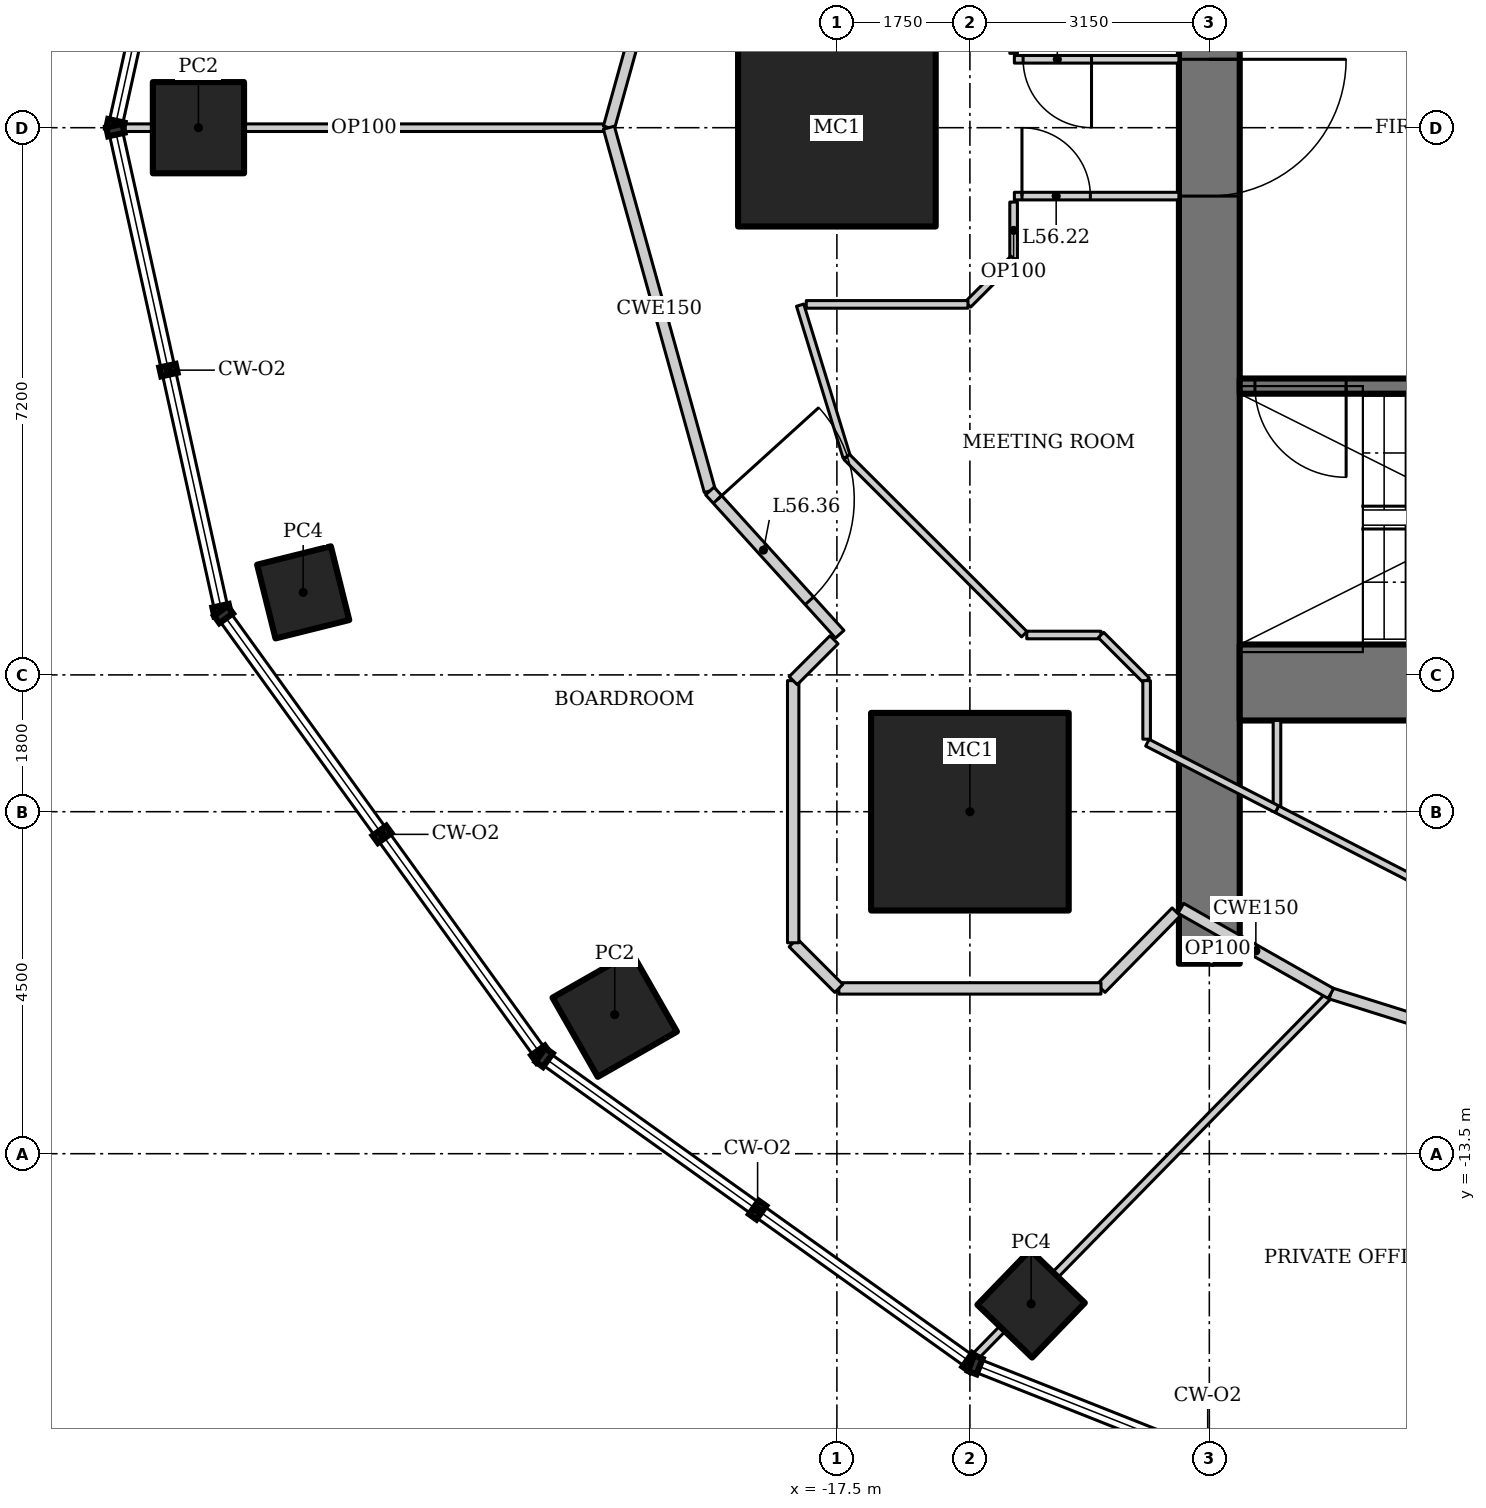
"""IFC4 building model, lengths in metres.
Left out: names, types, materials, properties, quantities, classifications, styles, units other than length and angle.
Written with IfcOpenShell. Run it as: python <this file> out.ifc"""

import sys

from ifc_helpers import new_model, si_unit, direction, frame, frame_2d, origin, origin_2d, place, context, subcontext, project, spatial, rectangle, hollow_rectangle, extrude, element, fill, save


model = new_model("IFC4")
c1 = context("Model", 3, precision=1e-05, world=origin(), true_north=direction((0.0, 1.0)))
c2 = subcontext(c1, "Body", "Model", "MODEL_VIEW")
j1 = project(units=[si_unit("LENGTHUNIT", "METRE"), si_unit("PLANEANGLEUNIT", "RADIAN")], contexts=[c1])
p1 = place(None, origin())
s1 = spatial("IfcSite", under=j1, at=p1, CompositionType="ELEMENT")
p2 = place(p1, origin())
s2 = spatial("IfcBuilding", under=s1, at=p2, CompositionType="ELEMENT")
p3 = place(p2, frame((0.0, 0.0, 241.0)))
s3 = spatial("IfcBuildingStorey", under=s2, at=p3, CompositionType="ELEMENT", Elevation=241.0)
for number, where, z_axis, x_axis in (
    (1, (-17.5, 0.0, 0.0), (0.0, 0.0, 1.0), (1.0, 0.0, 0.0)),
    (2, (-15.75, -9.0, 0.0), (0.0, 0.0, 1.0), (1.0, 0.0, 0.0)),
):
    element("IfcColumn", number, at=place(p3, frame(where, z_axis=z_axis, x_axis=x_axis)), inside=s3, PredefinedType="COLUMN", context=c2, shape_type="SweptSolid", body=[
        extrude(hollow_rectangle(XDim=2.6, YDim=2.6, WallThickness=0.13, at=origin_2d()), origin(), (0.0, 0.0, 1.0), 4.2),
    ])
p4 = place(p3, frame((-25.9, 0.0, 0.0), z_axis=(0.0, 0.0, 1.0), x_axis=(1.0, 0.0, 0.0)))
e3 = element("IfcColumn", 3, at=p4, inside=s3, PredefinedType="COLUMN", context=c2, shape_type="SweptSolid", body=[
    extrude(hollow_rectangle(XDim=1.2, YDim=1.2, WallThickness=0.1, at=origin_2d()), origin(), (0.0, 0.0, 1.0), 4.2),
])
p5 = place(p3, frame((-24.522, -6.114, 0.0), z_axis=(0.0, 0.0, 1.0), x_axis=(0.970295726276, 0.2419218956, 0.0)))
e4 = element("IfcColumn", 4, at=p5, inside=s3, PredefinedType="COLUMN", context=c2, shape_type="SweptSolid", body=[
    extrude(hollow_rectangle(XDim=1.0, YDim=1.0, WallThickness=0.08, at=origin_2d()), origin(), (0.0, 0.0, 1.0), 4.2),
])
p6 = place(p3, frame((-20.423, -11.67, 0.0), z_axis=(0.0, 0.0, 1.0), x_axis=(0.86824298017, 0.496139221777, 0.0)))
e5 = element("IfcColumn", 5, at=p6, inside=s3, PredefinedType="COLUMN", context=c2, shape_type="SweptSolid", body=[
    extrude(hollow_rectangle(XDim=1.2, YDim=1.2, WallThickness=0.1, at=origin_2d()), origin(), (0.0, 0.0, 1.0), 4.2),
])
p7 = place(p3, frame((-14.944, -15.475, 0.0), z_axis=(0.0, 0.0, 1.0), x_axis=(0.694658370459, 0.719339800339, 0.0)))
e6 = element("IfcColumn", 6, at=p7, inside=s3, PredefinedType="COLUMN", context=c2, shape_type="SweptSolid", body=[
    extrude(hollow_rectangle(XDim=1.0, YDim=1.0, WallThickness=0.08, at=origin_2d()), origin(), (0.0, 0.0, 1.0), 4.2),
])
p8 = place(p3, frame((-12.6, 11.0, 0.0), z_axis=(0.0, 0.0, 1.0), x_axis=(0.0, -1.0, 0.0)))
e7 = element("IfcWall", 7, at=p8, inside=s3, PredefinedType="SHEAR", context=c2, shape_type="SweptSolid", body=[
    extrude(rectangle(XDim=22.0, YDim=0.8, at=frame_2d((11.0, 0.0))), origin(), (0.0, 0.0, 1.0), 4.2),
])
p9 = place(p8, frame((10.1, 0.0, 0.0)))
e8 = element("IfcOpeningElement", 8, at=p9, cuts=e7, PredefinedType="OPENING", context=c2, shape_type="SweptSolid", body=[
    extrude(rectangle(XDim=1.8, YDim=2.1, at=frame_2d((0.9, 1.05))), frame((0.0, 0.41, 0.0), z_axis=(0.0, -1.0, 0.0), x_axis=(1.0, 0.0, 0.0)), (0.0, 0.0, 1.0), 0.82),
])
p10 = place(p3, frame((-12.2, -7.3, 0.0), z_axis=(0.0, 0.0, 1.0), x_axis=(1.0, 0.0, 0.0)))
e9 = element("IfcWall", 9, at=p10, inside=s3, PredefinedType="SHEAR", context=c2, shape_type="SweptSolid", body=[
    extrude(rectangle(XDim=24.4, YDim=1.0, at=frame_2d((12.2, 0.0))), origin(), (0.0, 0.0, 1.0), 4.2),
])
p11 = place(p3, frame((-5.6, -3.4, 0.0), z_axis=(0.0, 0.0, 1.0), x_axis=(-1.0, 0.0, 0.0)))
e10 = element("IfcWall", 10, at=p11, inside=s3, PredefinedType="SHEAR", context=c2, shape_type="SweptSolid", body=[
    extrude(rectangle(XDim=6.6, YDim=0.2, at=frame_2d((3.3, 0.0))), origin(), (0.0, 0.0, 1.0), 4.2),
])
p12 = place(p11, frame((5.2, 0.0, 0.0)))
e11 = element("IfcOpeningElement", 11, at=p12, cuts=e10, PredefinedType="OPENING", context=c2, shape_type="SweptSolid", body=[
    extrude(rectangle(XDim=1.2, YDim=2.1, at=frame_2d((0.6, 1.05))), frame((0.0, 0.11, 0.0), z_axis=(0.0, -1.0, 0.0), x_axis=(1.0, 0.0, 0.0)), (0.0, 0.0, 1.0), 0.22),
])
p13 = place(p3, frame((-26.944, 0.0, 0.0), z_axis=(0.0, 0.0, 1.0), x_axis=(1.0, 0.0, 0.0)))
e12 = element("IfcWall", 12, at=p13, inside=s3, PredefinedType="PARTITIONING", context=c2, shape_type="SweptSolid", body=[
    extrude(rectangle(XDim=6.444, YDim=0.1, at=frame_2d((3.222, 0.0))), origin(), (0.0, 0.0, 1.0), 3.349),
])
p14 = place(p3, frame((-15.709, -16.199, 0.0), z_axis=(0.0, 0.0, 1.0), x_axis=(0.699758297028, 0.71437967898, 0.0)))
e13 = element("IfcWall", 13, at=p14, inside=s3, PredefinedType="PARTITIONING", context=c2, shape_type="SweptSolid", body=[
    extrude(rectangle(XDim=6.729, YDim=0.1, at=frame_2d((3.365, 0.0))), origin(), (0.0, 0.0, 1.0), 3.41),
])
for number, where, z_axis, x_axis in (
    (14, (-19.172, 4.78, 0.0), (0.0, 0.0, 1.0), (-0.268, -0.964, 0.0)),
    (15, (-20.5, 0.0, 0.0), (0.0, 0.0, 1.0), (0.268, -0.964, 0.0)),
):
    element("IfcWall", number, at=place(p3, frame(where, z_axis=z_axis, x_axis=x_axis)), inside=s3, PredefinedType="PARTITIONING", context=c2, shape_type="SweptSolid", body=[
        extrude(rectangle(XDim=4.961, YDim=0.15, at=frame_2d((2.48, 0.0))), origin(), (0.0, 0.0, 1.0), 4.05),
    ])
p15 = place(p3, frame((-11.001, -11.392, 0.0), z_axis=(0.0, 0.0, 1.0), x_axis=(0.954031103669, -0.299707612903, 0.0)))
e16 = element("IfcWall", 16, at=p15, inside=s3, PredefinedType="PARTITIONING", context=c2, shape_type="SweptSolid", body=[
    extrude(rectangle(XDim=4.695, YDim=0.15, at=frame_2d((2.348, 0.0))), origin(), (0.0, 0.0, 1.0), 4.05),
])
p16 = place(p15, frame((2.0, 0.0, 0.0)))
e17 = element("IfcOpeningElement", 17, at=p16, cuts=e16, PredefinedType="OPENING", context=c2, shape_type="SweptSolid", body=[
    extrude(rectangle(XDim=0.9, YDim=2.1, at=frame_2d((0.45, 1.05))), frame((0.0, 0.085, 0.0), z_axis=(0.0, -1.0, 0.0), x_axis=(1.0, 0.0, 0.0)), (0.0, 0.0, 1.0), 0.17),
])
p17 = place(p3, frame((-11.71, -7.8, 0.0), z_axis=(0.0, 0.0, 1.0), x_axis=(0.0, -1.0, 0.0)))
e18 = element("IfcWall", 18, at=p17, inside=s3, PredefinedType="PARTITIONING", context=c2, shape_type="SweptSolid", body=[
    extrude(rectangle(XDim=1.167, YDim=0.1, at=frame_2d((0.583, 0.0))), origin(), (0.0, 0.0, 1.0), 4.05),
])
p18 = place(p3, frame((-9.67, -10.014, 0.0), z_axis=(0.0, 0.0, 1.0), x_axis=(-0.889605609385, 0.456729525814, 0.0)))
e19 = element("IfcWall", 19, at=p18, inside=s3, PredefinedType="PARTITIONING", context=c2, shape_type="SweptSolid", body=[
    extrude(rectangle(XDim=2.293, YDim=0.1, at=frame_2d((1.146, 0.0))), origin(), (0.0, 0.0, 1.0), 4.05),
])
p19 = place(p3, frame((-12.6, -11.0, 0.0), z_axis=(0.0, 0.0, 1.0), x_axis=(0.493794495037, 0.869578631678, 0.0)))
e20 = element("IfcWall", 20, at=p19, inside=s3, PredefinedType="PARTITIONING", context=c2, shape_type="SweptSolid", body=[
    extrude(rectangle(XDim=0.449, YDim=0.1, at=frame_2d((0.225, 0.0))), origin(), (0.0, 0.0, 1.0), 4.05),
])
p20 = place(p3, frame((-17.372, -4.331, 0.0), z_axis=(0.0, 0.0, 1.0), x_axis=(-0.293231279211, 0.956041535129, 0.0)))
e21 = element("IfcWall", 21, at=p20, inside=s3, PredefinedType="PARTITIONING", context=c2, shape_type="SweptSolid", body=[
    extrude(rectangle(XDim=2.088, YDim=0.1, at=frame_2d((1.044, 0.0))), origin(), (0.0, 0.0, 1.0), 4.05),
])
p21 = place(p3, frame((-15.165, -0.9, 0.0), z_axis=(0.0, 0.0, 1.0), x_axis=(1.0, 0.0, 0.0)))
e22 = element("IfcWall", 22, at=p21, inside=s3, PredefinedType="PARTITIONING", context=c2, shape_type="SweptSolid", body=[
    extrude(rectangle(XDim=2.165, YDim=0.1, at=frame_2d((1.083, 0.0))), origin(), (0.0, 0.0, 1.0), 4.05),
])
p22 = place(p21, frame((0.1, 0.0, 0.0)))
e23 = element("IfcOpeningElement", 23, at=p22, cuts=e22, PredefinedType="OPENING", context=c2, shape_type="SweptSolid", body=[
    extrude(rectangle(XDim=0.9, YDim=2.1, at=frame_2d((0.45, 1.05))), frame((0.0, 0.06, 0.0), z_axis=(0.0, -1.0, 0.0), x_axis=(1.0, 0.0, 0.0)), (0.0, 0.0, 1.0), 0.12),
])
p23 = place(p3, frame((-13.0, 0.9, 0.0), z_axis=(0.0, 0.0, 1.0), x_axis=(-1.0, 0.0, 0.0)))
e24 = element("IfcWall", 24, at=p23, inside=s3, PredefinedType="PARTITIONING", context=c2, shape_type="SweptSolid", body=[
    extrude(rectangle(XDim=2.165, YDim=0.1, at=frame_2d((1.083, 0.0))), origin(), (0.0, 0.0, 1.0), 4.05),
])
p24 = place(p23, frame((1.15, 0.0, 0.0)))
e25 = element("IfcOpeningElement", 25, at=p24, cuts=e24, PredefinedType="OPENING", context=c2, shape_type="SweptSolid", body=[
    extrude(rectangle(XDim=0.9, YDim=2.1, at=frame_2d((0.45, 1.05))), frame((0.0, 0.06, 0.0), z_axis=(0.0, -1.0, 0.0), x_axis=(1.0, 0.0, 0.0)), (0.0, 0.0, 1.0), 0.12),
])
p25 = place(p3, frame((-15.175, -0.978, 0.0), z_axis=(0.0, 0.0, 1.0), x_axis=(0.0, -1.0, 0.0)))
e26 = element("IfcWall", 26, at=p25, inside=s3, PredefinedType="PARTITIONING", context=c2, shape_type="SweptSolid", body=[
    extrude(rectangle(XDim=0.746, YDim=0.1, at=frame_2d((0.373, 0.0))), origin(), (0.0, 0.0, 1.0), 4.05),
])
p26 = place(p3, frame((-15.175, -1.725, 0.0), z_axis=(0.0, 0.0, 1.0), x_axis=(-0.707106781187, -0.707106781187, 0.0)))
e27 = element("IfcWall", 27, at=p26, inside=s3, PredefinedType="PARTITIONING", context=c2, shape_type="SweptSolid", body=[
    extrude(rectangle(XDim=0.849, YDim=0.1, at=frame_2d((0.425, 0.0))), origin(), (0.0, 0.0, 1.0), 4.05),
])
p27 = place(p3, frame((-15.775, -2.325, 0.0), z_axis=(0.0, 0.0, 1.0), x_axis=(-1.0, 0.0, 0.0)))
e28 = element("IfcWall", 28, at=p27, inside=s3, PredefinedType="PARTITIONING", context=c2, shape_type="SweptSolid", body=[
    extrude(rectangle(XDim=2.128, YDim=0.1, at=frame_2d((1.064, 0.0))), origin(), (0.0, 0.0, 1.0), 4.05),
])
p28 = place(p3, frame((-15.175, 1.725, 0.0), z_axis=(0.0, 0.0, 1.0), x_axis=(0.0, -1.0, 0.0)))
e29 = element("IfcWall", 29, at=p28, inside=s3, PredefinedType="PARTITIONING", context=c2, shape_type="SweptSolid", body=[
    extrude(rectangle(XDim=0.746, YDim=0.1, at=frame_2d((0.373, 0.0))), origin(), (0.0, 0.0, 1.0), 4.05),
])
p29 = place(p3, frame((-19.172, -4.78, 0.0), z_axis=(0.0, 0.0, 1.0), x_axis=(0.671721890643, -0.74080341632, 0.0)))
e30 = element("IfcWall", 30, at=p29, inside=s3, PredefinedType="PARTITIONING", context=c2, shape_type="SweptSolid", body=[
    extrude(rectangle(XDim=2.544, YDim=0.15, at=frame_2d((1.272, 0.0))), origin(), (0.0, 0.0, 1.0), 4.05),
])
p30 = place(p29, frame((0.15, 0.0, 0.0)))
e31 = element("IfcOpeningElement", 31, at=p30, cuts=e30, PredefinedType="OPENING", context=c2, shape_type="SweptSolid", body=[
    extrude(rectangle(XDim=1.8, YDim=2.1, at=frame_2d((0.9, 1.05))), frame((0.0, 0.085, 0.0), z_axis=(0.0, -1.0, 0.0), x_axis=(1.0, 0.0, 0.0)), (0.0, 0.0, 1.0), 0.17),
])
p31 = place(p3, frame((-12.975, -10.271, 0.0), z_axis=(0.0, 0.0, 1.0), x_axis=(0.869722107117, -0.493541747366, 0.0)))
e32 = element("IfcWall", 32, at=p31, inside=s3, PredefinedType="PARTITIONING", context=c2, shape_type="SweptSolid", body=[
    extrude(rectangle(XDim=2.27, YDim=0.15, at=frame_2d((1.135, 0.0))), origin(), (0.0, 0.0, 1.0), 4.05),
])
p32 = place(p3, frame((-11.71, -8.967, 0.0), z_axis=(0.0, 0.0, 1.0), x_axis=(-0.889638356137, 0.456665736935, 0.0)))
e33 = element("IfcWall", 33, at=p32, inside=s3, PredefinedType="PARTITIONING", context=c2, shape_type="SweptSolid", body=[
    extrude(rectangle(XDim=1.917, YDim=0.1, at=frame_2d((0.958, 0.0))), origin(), (0.0, 0.0, 1.0), 4.05),
])
p33 = place(p3, frame((-15.035, -6.665, 0.0), z_axis=(0.0, 0.0, 1.0), x_axis=(-0.707587114823, 0.70662612104, 0.0)))
e34 = element("IfcWall", 34, at=p33, inside=s3, PredefinedType="PARTITIONING", context=c2, shape_type="SweptSolid", body=[
    extrude(rectangle(XDim=3.303, YDim=0.1, at=frame_2d((1.651, 0.0))), origin(), (0.0, 0.0, 1.0), 4.05),
])
p34 = place(p3, frame((-15.002, -6.675, 0.0), z_axis=(0.0, 0.0, 1.0), x_axis=(1.0, 0.0, 0.0)))
e35 = element("IfcWall", 35, at=p34, inside=s3, PredefinedType="PARTITIONING", context=c2, shape_type="SweptSolid", body=[
    extrude(rectangle(XDim=0.977, YDim=0.1, at=frame_2d((0.488, 0.0))), origin(), (0.0, 0.0, 1.0), 4.05),
])
p35 = place(p3, frame((-14.025, -6.675, 0.0), z_axis=(0.0, 0.0, 1.0), x_axis=(0.707106781187, -0.707106781187, 0.0)))
e36 = element("IfcWall", 36, at=p35, inside=s3, PredefinedType="PARTITIONING", context=c2, shape_type="SweptSolid", body=[
    extrude(rectangle(XDim=0.849, YDim=0.1, at=frame_2d((0.425, 0.0))), origin(), (0.0, 0.0, 1.0), 4.05),
])
p36 = place(p3, frame((-13.425, -7.275, 0.0), z_axis=(0.0, 0.0, 1.0), x_axis=(0.0, -1.0, 0.0)))
e37 = element("IfcWall", 37, at=p36, inside=s3, PredefinedType="PARTITIONING", context=c2, shape_type="SweptSolid", body=[
    extrude(rectangle(XDim=0.77, YDim=0.1, at=frame_2d((0.385, 0.0))), origin(), (0.0, 0.0, 1.0), 4.05),
])
p37 = place(p3, frame((-13.036, -10.319, 0.0), z_axis=(0.0, 0.0, 1.0), x_axis=(-0.701113567316, -0.713049623606, 0.0)))
e38 = element("IfcWall", 38, at=p37, inside=s3, PredefinedType="PARTITIONING", context=c2, shape_type="SweptSolid", body=[
    extrude(rectangle(XDim=1.411, YDim=0.15, at=frame_2d((0.706, 0.0))), origin(), (0.0, 0.0, 1.0), 4.05),
])
p38 = place(p3, frame((-14.025, -11.325, 0.0), z_axis=(0.0, 0.0, 1.0), x_axis=(-1.0, 0.0, 0.0)))
e39 = element("IfcWall", 39, at=p38, inside=s3, PredefinedType="PARTITIONING", context=c2, shape_type="SweptSolid", body=[
    extrude(rectangle(XDim=3.449, YDim=0.15, at=frame_2d((1.725, 0.0))), origin(), (0.0, 0.0, 1.0), 4.05),
])
p39 = place(p3, frame((-17.475, -11.325, 0.0), z_axis=(0.0, 0.0, 1.0), x_axis=(-0.707106781187, 0.707106781187, 0.0)))
e40 = element("IfcWall", 40, at=p39, inside=s3, PredefinedType="PARTITIONING", context=c2, shape_type="SweptSolid", body=[
    extrude(rectangle(XDim=0.849, YDim=0.15, at=frame_2d((0.425, 0.0))), origin(), (0.0, 0.0, 1.0), 4.05),
])
p40 = place(p3, frame((-18.075, -10.725, 0.0), z_axis=(0.0, 0.0, 1.0), x_axis=(0.0, 1.0, 0.0)))
e41 = element("IfcWall", 41, at=p40, inside=s3, PredefinedType="PARTITIONING", context=c2, shape_type="SweptSolid", body=[
    extrude(rectangle(XDim=3.449, YDim=0.15, at=frame_2d((1.725, 0.0))), origin(), (0.0, 0.0, 1.0), 3.6),
])
p41 = place(p3, frame((-18.075, -7.275, 0.0), z_axis=(0.0, 0.0, 1.0), x_axis=(0.707106781187, 0.707106781187, 0.0)))
e42 = element("IfcWall", 42, at=p41, inside=s3, PredefinedType="PARTITIONING", context=c2, shape_type="SweptSolid", body=[
    extrude(rectangle(XDim=0.76, YDim=0.15, at=frame_2d((0.38, 0.0))), origin(), (0.0, 0.0, 1.0), 4.05),
])
p42 = place(p12, origin())
e43 = element("IfcDoor", 43, at=p42, inside=s3, OperationType="SINGLE_SWING_RIGHT", PredefinedType="DOOR", context=c2, shape_type="SweptSolid", body=[
    extrude(rectangle(XDim=1.2, YDim=2.1, at=frame_2d((0.6, 1.05))), frame((0.0, 0.025, 0.0), z_axis=(0.0, -1.0, 0.0), x_axis=(1.0, 0.0, 0.0)), (0.0, 0.0, 1.0), 0.05),
])
fill(e11, e43)
p43 = place(p9, origin())
e44 = element("IfcDoor", 44, at=p43, inside=s3, OperationType="DOUBLE_DOOR_DOUBLE_SWING", PredefinedType="DOOR", context=c2, shape_type="SweptSolid", body=[
    extrude(rectangle(XDim=1.8, YDim=2.1, at=frame_2d((0.9, 1.05))), frame((0.0, 0.025, 0.0), z_axis=(0.0, -1.0, 0.0), x_axis=(1.0, 0.0, 0.0)), (0.0, 0.0, 1.0), 0.05),
])
fill(e8, e44)
p44 = place(p22, origin())
e45 = element("IfcDoor", 45, at=p44, inside=s3, OperationType="SINGLE_SWING_LEFT", PredefinedType="DOOR", context=c2, shape_type="SweptSolid", body=[
    extrude(rectangle(XDim=0.9, YDim=2.1, at=frame_2d((0.45, 1.05))), frame((0.0, 0.025, 0.0), z_axis=(0.0, -1.0, 0.0), x_axis=(1.0, 0.0, 0.0)), (0.0, 0.0, 1.0), 0.05),
])
fill(e23, e45)
p45 = place(p24, origin())
e46 = element("IfcDoor", 46, at=p45, inside=s3, OperationType="SINGLE_SWING_LEFT", PredefinedType="DOOR", context=c2, shape_type="SweptSolid", body=[
    extrude(rectangle(XDim=0.9, YDim=2.1, at=frame_2d((0.45, 1.05))), frame((0.0, 0.025, 0.0), z_axis=(0.0, -1.0, 0.0), x_axis=(1.0, 0.0, 0.0)), (0.0, 0.0, 1.0), 0.05),
])
fill(e25, e46)
p46 = place(p30, origin())
e47 = element("IfcDoor", 47, at=p46, inside=s3, OperationType="DOUBLE_DOOR_DOUBLE_SWING", PredefinedType="DOOR", context=c2, shape_type="SweptSolid", body=[
    extrude(rectangle(XDim=1.8, YDim=2.1, at=frame_2d((0.9, 1.05))), frame((0.0, 0.025, 0.0), z_axis=(0.0, -1.0, 0.0), x_axis=(1.0, 0.0, 0.0)), (0.0, 0.0, 1.0), 0.05),
])
fill(e31, e47)
save(model, sys.argv[1])
